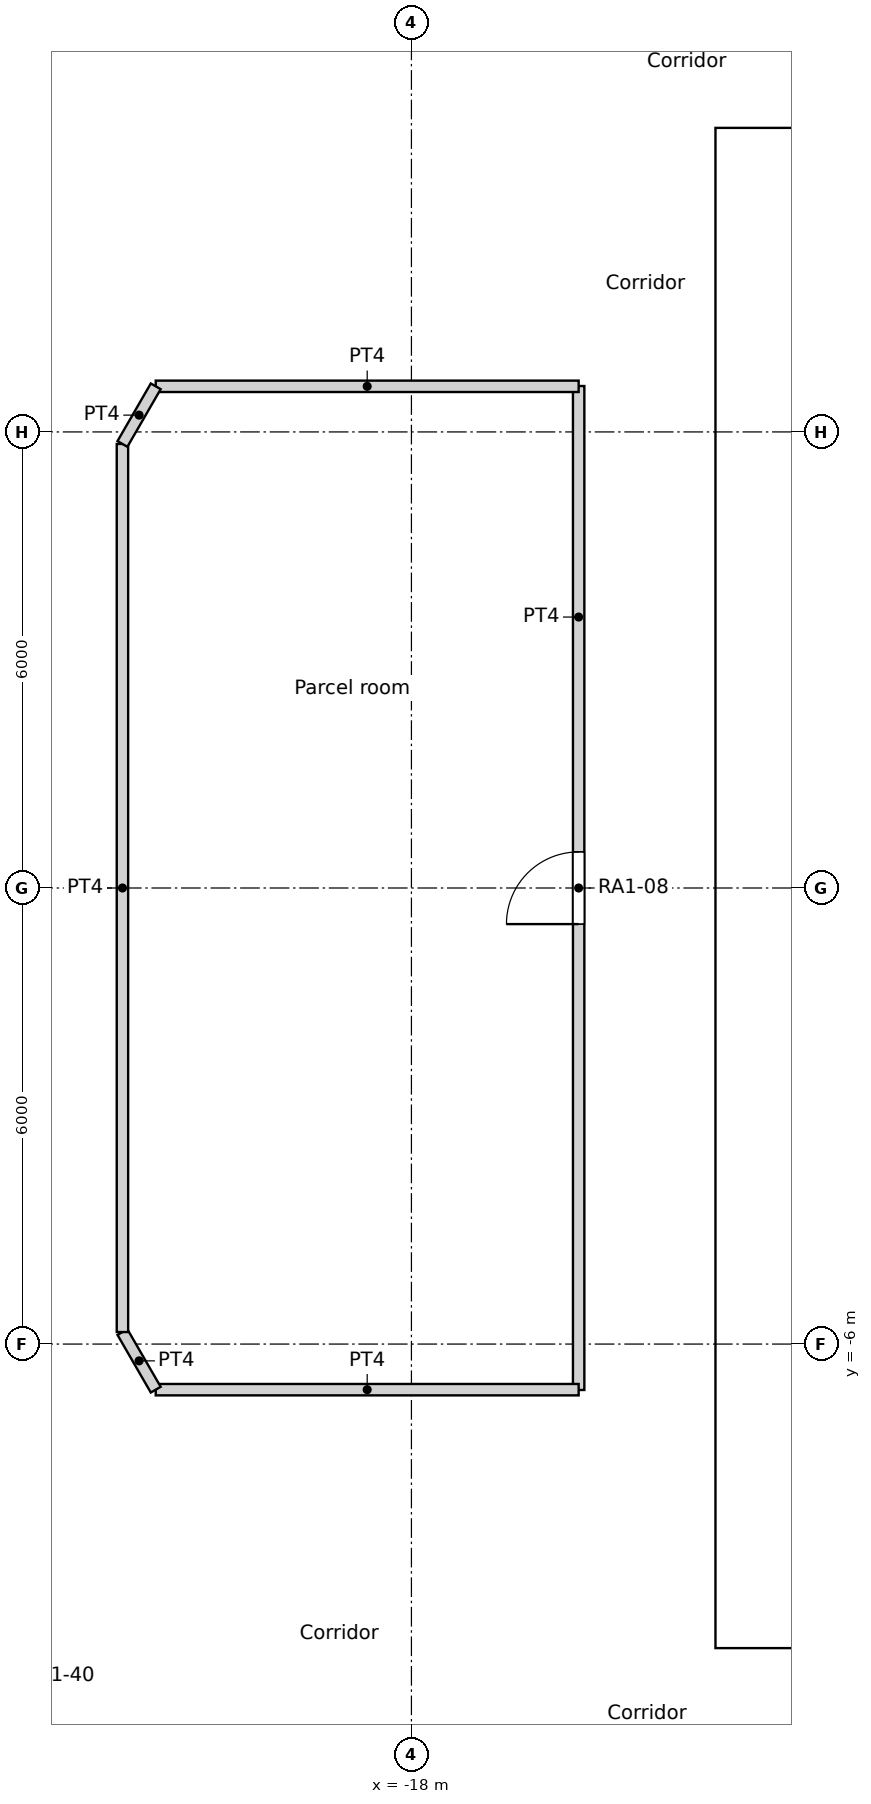
"""IFC4 building model, lengths in metres.
Left out: names, types, materials, properties, quantities, classifications, styles, units other than length and angle.
Written with IfcOpenShell. Run it as: python <this file> out.ifc"""

import sys

from ifc_helpers import new_model, si_unit, direction, frame, frame_2d, origin, origin_2d, place, context, subcontext, project, spatial, rectangle, circle, extrude, element, fill, save


model = new_model("IFC4")
c1 = context("Model", 3, precision=1e-05, world=origin(), true_north=direction((0.0, 1.0)))
c2 = subcontext(c1, "Body", "Model", "MODEL_VIEW")
j1 = project(units=[si_unit("LENGTHUNIT", "METRE"), si_unit("PLANEANGLEUNIT", "RADIAN")], contexts=[c1])
p1 = place(None, origin())
s1 = spatial("IfcSite", under=j1, at=p1, CompositionType="ELEMENT")
p2 = place(p1, origin())
s2 = spatial("IfcBuilding", under=s1, at=p2, CompositionType="ELEMENT")
p3 = place(p2, frame((0.0, 0.0, 28.2)))
s3 = spatial("IfcBuildingStorey", under=s2, at=p3, CompositionType="ELEMENT", Elevation=28.2)
for number, where, z_axis, x_axis in (
    (1, (-23.067, 8.396, 0.0), (0.0, 0.0, 1.0), (1.0, 0.0, 0.0)),
    (2, (-23.067, -8.396, 0.0), (0.0, 0.0, 1.0), (1.0, 0.0, 0.0)),
):
    element("IfcColumn", number, at=place(p3, frame(where, z_axis=z_axis, x_axis=x_axis)), inside=s3, PredefinedType="COLUMN", context=c2, shape_type="SweptSolid", body=[
        extrude(circle(Radius=0.75, at=origin_2d()), origin(), (0.0, 0.0, 1.0), 3.6),
    ])
for number, where, z_axis, x_axis in (
    (3, (-16.958, 8.167, 0.0), (0.0, 0.0, 1.0), (1.0, 0.0, 0.0)),
    (4, (-18.612, 2.805, 0.0), (0.0, 0.0, 1.0), (1.0, 0.0, 0.0)),
    (5, (-18.612, -2.805, 0.0), (0.0, 0.0, 1.0), (1.0, 0.0, 0.0)),
    (6, (-16.958, -8.167, 0.0), (0.0, 0.0, 1.0), (1.0, 0.0, 0.0)),
):
    element("IfcColumn", number, at=place(p3, frame(where, z_axis=z_axis, x_axis=x_axis)), inside=s3, PredefinedType="COLUMN", context=c2, shape_type="SweptSolid", body=[
        extrude(circle(Radius=0.8, at=origin_2d()), origin(), (0.0, 0.0, 1.0), 3.6),
    ])
p4 = place(p3, frame((-14.0, -9.4, 0.0), z_axis=(0.0, 0.0, 1.0), x_axis=(1.0, 0.0, 0.0)))
e7 = element("IfcWall", 7, at=p4, inside=s3, PredefinedType="SOLIDWALL", context=c2, shape_type="SweptSolid", body=[
    extrude(rectangle(XDim=28.0, YDim=1.2, at=frame_2d((14.0, 0.0))), origin(), (0.0, 0.0, 1.0), 3.6),
])
p5 = place(p4, frame((14.9, 0.0, 0.0)))
e8 = element("IfcOpeningElement", 8, at=p5, cuts=e7, PredefinedType="OPENING", context=c2, shape_type="SweptSolid", body=[
    extrude(rectangle(XDim=1.0, YDim=2.1, at=frame_2d((0.5, 1.05))), frame((0.0, 0.6, 0.0), z_axis=(0.0, -1.0, 0.0), x_axis=(1.0, 0.0, 0.0)), (0.0, 0.0, 1.0), 1.2),
])
p6 = place(p4, frame((9.8, 0.0, 0.0)))
e9 = element("IfcOpeningElement", 9, at=p6, cuts=e7, PredefinedType="OPENING", context=c2, shape_type="SweptSolid", body=[
    extrude(rectangle(XDim=1.8, YDim=2.1, at=frame_2d((0.9, 1.05))), frame((0.0, 0.6, 0.0), z_axis=(0.0, -1.0, 0.0), x_axis=(1.0, 0.0, 0.0)), (0.0, 0.0, 1.0), 1.2),
])
p7 = place(p4, frame((16.4, 0.0, 0.0)))
e10 = element("IfcOpeningElement", 10, at=p7, cuts=e7, PredefinedType="OPENING", context=c2, shape_type="SweptSolid", body=[
    extrude(rectangle(XDim=1.8, YDim=2.1, at=frame_2d((0.9, 1.05))), frame((0.0, 0.6, 0.0), z_axis=(0.0, -1.0, 0.0), x_axis=(1.0, 0.0, 0.0)), (0.0, 0.0, 1.0), 1.2),
])
p8 = place(p3, frame((-14.0, 9.4, 0.0), z_axis=(0.0, 0.0, 1.0), x_axis=(1.0, 0.0, 0.0)))
e11 = element("IfcWall", 11, at=p8, inside=s3, PredefinedType="SOLIDWALL", context=c2, shape_type="SweptSolid", body=[
    extrude(rectangle(XDim=28.0, YDim=1.2, at=frame_2d((14.0, 0.0))), origin(), (0.0, 0.0, 1.0), 3.6),
])
p9 = place(p8, frame((9.8, 0.0, 0.0)))
e12 = element("IfcOpeningElement", 12, at=p9, cuts=e11, PredefinedType="OPENING", context=c2, shape_type="SweptSolid", body=[
    extrude(rectangle(XDim=1.8, YDim=2.1, at=frame_2d((0.9, 1.05))), frame((0.0, 0.6, 0.0), z_axis=(0.0, -1.0, 0.0), x_axis=(1.0, 0.0, 0.0)), (0.0, 0.0, 1.0), 1.2),
])
p10 = place(p3, frame((-13.4, -8.8, 0.0), z_axis=(0.0, 0.0, 1.0), x_axis=(0.0, 1.0, 0.0)))
e13 = element("IfcWall", 13, at=p10, inside=s3, PredefinedType="SOLIDWALL", context=c2, shape_type="SweptSolid", body=[
    extrude(rectangle(XDim=17.6, YDim=1.2, at=frame_2d((8.8, 0.0))), origin(), (0.0, 0.0, 1.0), 3.6),
])
p11 = place(p10, frame((5.2, 0.0, 0.0)))
e14 = element("IfcOpeningElement", 14, at=p11, cuts=e13, PredefinedType="OPENING", context=c2, shape_type="SweptSolid", body=[
    extrude(rectangle(XDim=1.0, YDim=2.1, at=frame_2d((0.5, 1.05))), frame((0.0, 0.6, 0.0), z_axis=(0.0, -1.0, 0.0), x_axis=(1.0, 0.0, 0.0)), (0.0, 0.0, 1.0), 1.2),
])
p12 = place(p10, frame((11.4, 0.0, 0.0)))
e15 = element("IfcOpeningElement", 15, at=p12, cuts=e13, PredefinedType="OPENING", context=c2, shape_type="SweptSolid", body=[
    extrude(rectangle(XDim=1.0, YDim=2.1, at=frame_2d((0.5, 1.05))), frame((0.0, 0.6, 0.0), z_axis=(0.0, -1.0, 0.0), x_axis=(1.0, 0.0, 0.0)), (0.0, 0.0, 1.0), 1.2),
])
p13 = place(p3, frame((-15.8, -6.604, 0.0), z_axis=(0.0, 0.0, 1.0), x_axis=(0.0, 1.0, 0.0)))
e16 = element("IfcWall", 16, at=p13, inside=s3, PredefinedType="PARTITIONING", context=c2, shape_type="SweptSolid", body=[
    extrude(rectangle(XDim=13.208, YDim=0.15, at=frame_2d((6.604, 0.0))), origin(), (0.0, 0.0, 1.0), 3.15),
])
p14 = place(p13, frame((6.129, 0.0, 0.0)))
e17 = element("IfcOpeningElement", 17, at=p14, cuts=e16, PredefinedType="OPENING", context=c2, shape_type="SweptSolid", body=[
    extrude(rectangle(XDim=0.95, YDim=2.1, at=frame_2d((0.475, 1.05))), frame((0.0, 0.075, 0.0), z_axis=(0.0, -1.0, 0.0), x_axis=(1.0, 0.0, 0.0)), (0.0, 0.0, 1.0), 0.15),
])
p15 = place(p3, frame((-21.364, 6.6, 0.0), z_axis=(0.0, 0.0, 1.0), x_axis=(1.0, 0.0, 0.0)))
e18 = element("IfcWall", 18, at=p15, inside=s3, PredefinedType="PARTITIONING", context=c2, shape_type="SweptSolid", body=[
    extrude(rectangle(XDim=5.564, YDim=0.15, at=frame_2d((2.782, 0.0))), origin(), (0.0, 0.0, 1.0), 3.15),
])
p16 = place(p3, frame((-21.802, 5.842, 0.0), z_axis=(0.0, 0.0, 1.0), x_axis=(0.500277597875, 0.865865073245, 0.0)))
e19 = element("IfcWall", 19, at=p16, inside=s3, PredefinedType="PARTITIONING", context=c2, shape_type="SweptSolid", body=[
    extrude(rectangle(XDim=0.875, YDim=0.15, at=frame_2d((0.438, 0.0))), origin(), (0.0, 0.0, 1.0), 3.15),
])
p17 = place(p3, frame((-21.802, -5.842, 0.0), z_axis=(0.0, 0.0, 1.0), x_axis=(0.0, 1.0, 0.0)))
e20 = element("IfcWall", 20, at=p17, inside=s3, PredefinedType="PARTITIONING", context=c2, shape_type="SweptSolid", body=[
    extrude(rectangle(XDim=11.684, YDim=0.15, at=frame_2d((5.842, 0.0))), origin(), (0.0, 0.0, 1.0), 3.15),
])
p18 = place(p3, frame((-21.802, -5.842, 0.0), z_axis=(0.0, 0.0, 1.0), x_axis=(0.500277597875, -0.865865073245, 0.0)))
e21 = element("IfcWall", 21, at=p18, inside=s3, PredefinedType="PARTITIONING", context=c2, shape_type="SweptSolid", body=[
    extrude(rectangle(XDim=0.875, YDim=0.15, at=frame_2d((0.438, 0.0))), origin(), (0.0, 0.0, 1.0), 3.15),
])
p19 = place(p3, frame((-21.364, -6.6, 0.0), z_axis=(0.0, 0.0, 1.0), x_axis=(1.0, 0.0, 0.0)))
e22 = element("IfcWall", 22, at=p19, inside=s3, PredefinedType="PARTITIONING", context=c2, shape_type="SweptSolid", body=[
    extrude(rectangle(XDim=5.564, YDim=0.15, at=frame_2d((2.782, 0.0))), origin(), (0.0, 0.0, 1.0), 3.15),
])
p20 = place(p3, frame((-25.251, 7.414, 0.0), z_axis=(0.0, 0.0, 1.0), x_axis=(0.540498462047, 0.84134500208, 0.0)))
e23 = element("IfcWall", 23, at=p20, inside=s3, PredefinedType="PARTITIONING", context=c2, shape_type="SweptSolid", body=[
    extrude(rectangle(XDim=12.811, YDim=0.15, at=frame_2d((6.405, 0.0))), origin(), (0.0, 0.0, 1.0), 3.15),
])
p21 = place(p20, frame((10.817, 0.0, 0.0)))
e24 = element("IfcOpeningElement", 24, at=p21, cuts=e23, PredefinedType="OPENING", context=c2, shape_type="SweptSolid", body=[
    extrude(rectangle(XDim=1.0, YDim=2.1, at=frame_2d((0.5, 1.05))), frame((0.0, 0.075, 0.0), z_axis=(0.0, -1.0, 0.0), x_axis=(1.0, 0.0, 0.0)), (0.0, 0.0, 1.0), 0.15),
])
p22 = place(p20, frame((4.415, 0.0, 0.0)))
e25 = element("IfcOpeningElement", 25, at=p22, cuts=e23, PredefinedType="OPENING", context=c2, shape_type="SweptSolid", body=[
    extrude(rectangle(XDim=1.0, YDim=2.04, at=frame_2d((0.5, 1.02))), frame((0.0, 0.075, 0.0), z_axis=(0.0, -1.0, 0.0), x_axis=(1.0, 0.0, 0.0)), (0.0, 0.0, 1.0), 0.15),
])
p23 = place(p3, frame((-25.252, -7.415, 0.0), z_axis=(0.0, 0.0, 1.0), x_axis=(0.540498462047, -0.84134500208, 0.0)))
e26 = element("IfcWall", 26, at=p23, inside=s3, PredefinedType="PARTITIONING", context=c2, shape_type="SweptSolid", body=[
    extrude(rectangle(XDim=12.811, YDim=0.15, at=frame_2d((6.405, 0.0))), origin(), (0.0, 0.0, 1.0), 3.15),
])
p24 = place(p23, frame((3.013, 0.0, 0.0)))
e27 = element("IfcOpeningElement", 27, at=p24, cuts=e26, PredefinedType="OPENING", context=c2, shape_type="SweptSolid", body=[
    extrude(rectangle(XDim=1.0, YDim=2.1, at=frame_2d((0.5, 1.05))), frame((0.0, 0.075, 0.0), z_axis=(0.0, -1.0, 0.0), x_axis=(1.0, 0.0, 0.0)), (0.0, 0.0, 1.0), 0.15),
])
p25 = place(p23, frame((5.452, 0.0, 0.0)))
e28 = element("IfcOpeningElement", 28, at=p25, cuts=e26, PredefinedType="OPENING", context=c2, shape_type="SweptSolid", body=[
    extrude(rectangle(XDim=1.0, YDim=2.1, at=frame_2d((0.5, 1.05))), frame((0.0, 0.075, 0.0), z_axis=(0.0, -1.0, 0.0), x_axis=(1.0, 0.0, 0.0)), (0.0, 0.0, 1.0), 0.15),
])
p26 = place(p23, frame((10.817, 0.0, 0.0)))
e29 = element("IfcOpeningElement", 29, at=p26, cuts=e26, PredefinedType="OPENING", context=c2, shape_type="SweptSolid", body=[
    extrude(rectangle(XDim=1.0, YDim=2.1, at=frame_2d((0.5, 1.05))), frame((0.0, 0.075, 0.0), z_axis=(0.0, -1.0, 0.0), x_axis=(1.0, 0.0, 0.0)), (0.0, 0.0, 1.0), 0.15),
])
p27 = place(p11, origin())
e30 = element("IfcDoor", 30, at=p27, inside=s3, OperationType="DOUBLE_DOOR_SINGLE_SWING", PredefinedType="DOOR", context=c2, shape_type="SweptSolid", body=[
    extrude(rectangle(XDim=1.0, YDim=2.1, at=frame_2d((0.5, 1.05))), frame((0.0, 0.025, 0.0), z_axis=(0.0, -1.0, 0.0), x_axis=(1.0, 0.0, 0.0)), (0.0, 0.0, 1.0), 0.05),
])
fill(e14, e30)
p28 = place(p12, origin())
e31 = element("IfcDoor", 31, at=p28, inside=s3, OperationType="DOUBLE_DOOR_SINGLE_SWING", PredefinedType="DOOR", context=c2, shape_type="SweptSolid", body=[
    extrude(rectangle(XDim=1.0, YDim=2.1, at=frame_2d((0.5, 1.05))), frame((0.0, 0.025, 0.0), z_axis=(0.0, -1.0, 0.0), x_axis=(1.0, 0.0, 0.0)), (0.0, 0.0, 1.0), 0.05),
])
fill(e15, e31)
p29 = place(p14, origin())
e32 = element("IfcDoor", 32, at=p29, inside=s3, OperationType="SINGLE_SWING_LEFT", PredefinedType="DOOR", context=c2, shape_type="SweptSolid", body=[
    extrude(rectangle(XDim=0.95, YDim=2.1, at=frame_2d((0.475, 1.05))), frame((0.0, 0.025, 0.0), z_axis=(0.0, -1.0, 0.0), x_axis=(1.0, 0.0, 0.0)), (0.0, 0.0, 1.0), 0.05),
])
fill(e17, e32)
save(model, sys.argv[1])
